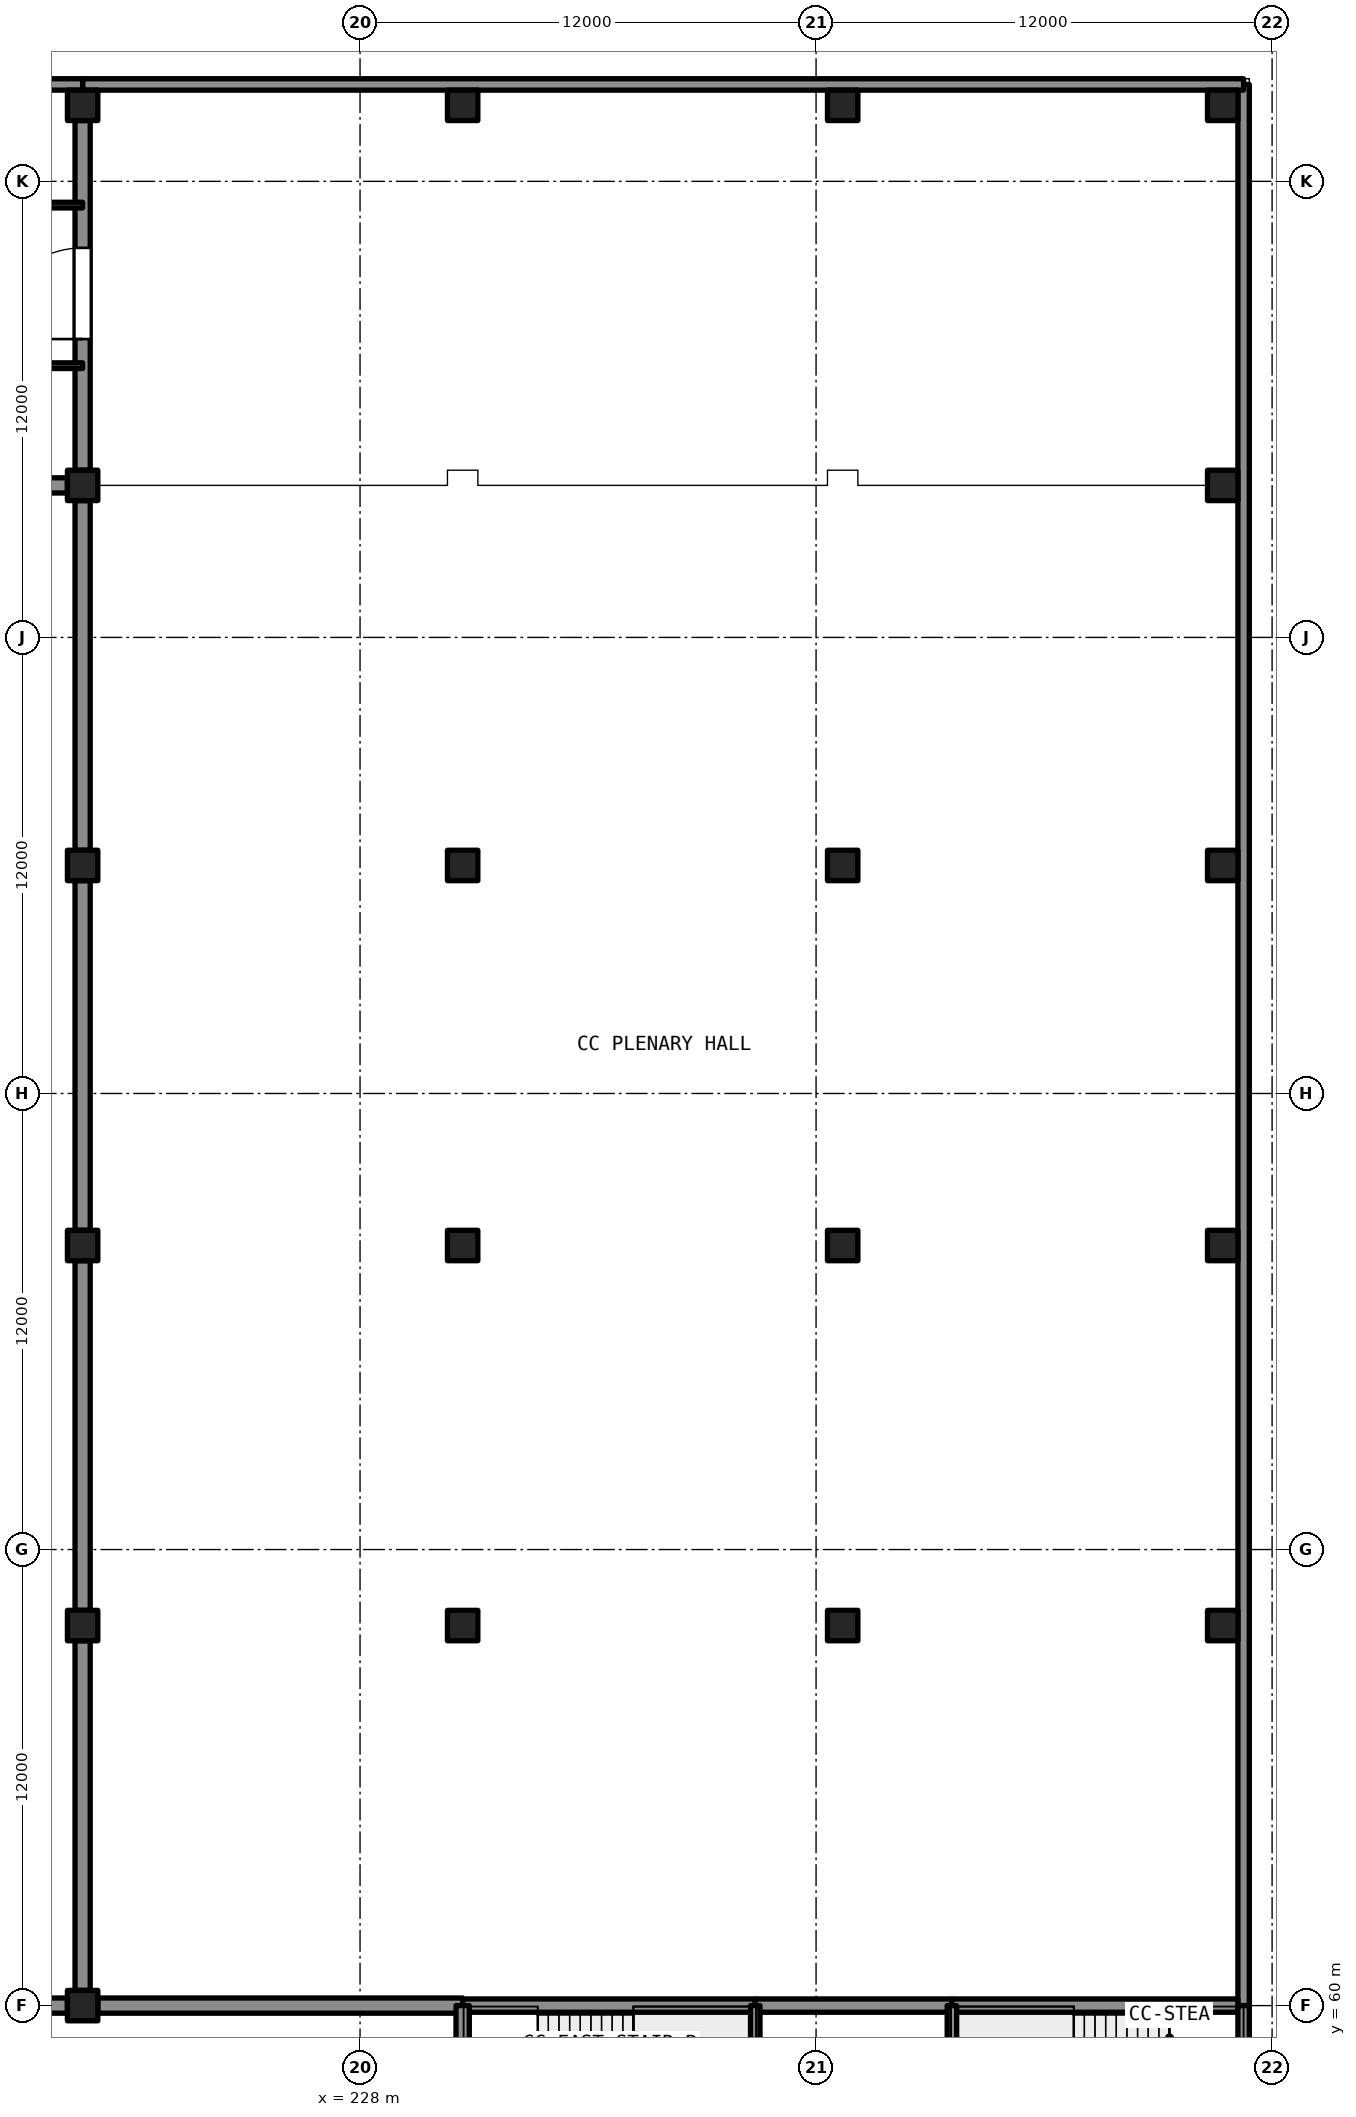
"""IFC4 building model, lengths in metres.
Left out: names, types, materials, properties, quantities, classifications, styles, units other than length and angle.
Written with IfcOpenShell. Run it as: python <this file> out.ifc"""

import sys

from ifc_helpers import new_model, si_unit, direction, frame, frame_2d, origin, origin_2d, place, context, subcontext, project, spatial, rectangle, extrude, element, fill, save


model = new_model("IFC4")
c1 = context("Model", 3, precision=1e-05, world=origin(), true_north=direction((0.0, 1.0)))
c2 = subcontext(c1, "Body", "Model", "MODEL_VIEW")
j1 = project(units=[si_unit("LENGTHUNIT", "METRE"), si_unit("PLANEANGLEUNIT", "RADIAN")], contexts=[c1])
p1 = place(None, origin())
s1 = spatial("IfcSite", under=j1, at=p1, CompositionType="ELEMENT")
p2 = place(p1, origin())
s2 = spatial("IfcBuilding", under=s1, at=p2, CompositionType="ELEMENT")
p3 = place(p2, frame((0.0, 0.0, 9.0)))
s3 = spatial("IfcBuildingStorey", under=s2, at=p3, CompositionType="ELEMENT", Elevation=9.0)
for number, where, z_axis, x_axis in (
    (1, (220.7, 60.0, 0.0), (0.0, 0.0, 1.0), (1.0, 0.0, 0.0)),
    (2, (220.7, 70.0, 0.0), (0.0, 0.0, 1.0), (1.0, 0.0, 0.0)),
    (3, (220.7, 80.0, 0.0), (0.0, 0.0, 1.0), (1.0, 0.0, 0.0)),
    (4, (220.7, 90.0, 0.0), (0.0, 0.0, 1.0), (1.0, 0.0, 0.0)),
    (5, (220.7, 100.0, 0.0), (0.0, 0.0, 1.0), (1.0, 0.0, 0.0)),
    (6, (220.7, 110.0, 0.0), (0.0, 0.0, 1.0), (1.0, 0.0, 0.0)),
):
    element("IfcColumn", number, at=place(p3, frame(where, z_axis=z_axis, x_axis=x_axis)), inside=s3, PredefinedType="COLUMN", context=c2, shape_type="SweptSolid", body=[
        extrude(rectangle(XDim=0.8, YDim=0.8, at=origin_2d()), origin(), (0.0, 0.0, 1.0), 6.0),
    ])
p4 = place(p3, frame((230.7, 70.0, 0.0), z_axis=(0.0, 0.0, 1.0), x_axis=(1.0, 0.0, 0.0)))
e7 = element("IfcColumn", 7, at=p4, inside=s3, PredefinedType="COLUMN", context=c2, shape_type="SweptSolid", body=[
    extrude(rectangle(XDim=0.8, YDim=0.8, at=origin_2d()), origin(), (0.0, 0.0, 1.0), 4.045),
])
p5 = place(p3, frame((230.7, 80.0, 0.0), z_axis=(0.0, 0.0, 1.0), x_axis=(1.0, 0.0, 0.0)))
e8 = element("IfcColumn", 8, at=p5, inside=s3, PredefinedType="COLUMN", context=c2, shape_type="SweptSolid", body=[
    extrude(rectangle(XDim=0.8, YDim=0.8, at=origin_2d()), origin(), (0.0, 0.0, 1.0), 2.545),
])
p6 = place(p3, frame((230.7, 90.0, 0.0), z_axis=(0.0, 0.0, 1.0), x_axis=(1.0, 0.0, 0.0)))
e9 = element("IfcColumn", 9, at=p6, inside=s3, PredefinedType="COLUMN", context=c2, shape_type="SweptSolid", body=[
    extrude(rectangle(XDim=0.8, YDim=0.8, at=origin_2d()), origin(), (0.0, 0.0, 1.0), 1.045),
])
p7 = place(p3, frame((230.7, 110.0, 0.0), z_axis=(0.0, 0.0, 1.0), x_axis=(1.0, 0.0, 0.0)))
e10 = element("IfcColumn", 10, at=p7, inside=s3, PredefinedType="COLUMN", context=c2, shape_type="SweptSolid", body=[
    extrude(rectangle(XDim=0.8, YDim=0.8, at=origin_2d()), origin(), (0.0, 0.0, 1.0), 6.0),
])
p8 = place(p3, frame((240.7, 70.0, 0.0), z_axis=(0.0, 0.0, 1.0), x_axis=(1.0, 0.0, 0.0)))
e11 = element("IfcColumn", 11, at=p8, inside=s3, PredefinedType="COLUMN", context=c2, shape_type="SweptSolid", body=[
    extrude(rectangle(XDim=0.8, YDim=0.8, at=origin_2d()), origin(), (0.0, 0.0, 1.0), 4.045),
])
p9 = place(p3, frame((240.7, 80.0, 0.0), z_axis=(0.0, 0.0, 1.0), x_axis=(1.0, 0.0, 0.0)))
e12 = element("IfcColumn", 12, at=p9, inside=s3, PredefinedType="COLUMN", context=c2, shape_type="SweptSolid", body=[
    extrude(rectangle(XDim=0.8, YDim=0.8, at=origin_2d()), origin(), (0.0, 0.0, 1.0), 2.545),
])
p10 = place(p3, frame((240.7, 90.0, 0.0), z_axis=(0.0, 0.0, 1.0), x_axis=(1.0, 0.0, 0.0)))
e13 = element("IfcColumn", 13, at=p10, inside=s3, PredefinedType="COLUMN", context=c2, shape_type="SweptSolid", body=[
    extrude(rectangle(XDim=0.8, YDim=0.8, at=origin_2d()), origin(), (0.0, 0.0, 1.0), 1.045),
])
for number, where, z_axis, x_axis in (
    (14, (240.7, 110.0, 0.0), (0.0, 0.0, 1.0), (1.0, 0.0, 0.0)),
    (15, (250.7, 70.0, 0.0), (0.0, 0.0, 1.0), (1.0, 0.0, 0.0)),
    (16, (250.7, 80.0, 0.0), (0.0, 0.0, 1.0), (1.0, 0.0, 0.0)),
    (17, (250.7, 90.0, 0.0), (0.0, 0.0, 1.0), (1.0, 0.0, 0.0)),
    (18, (250.7, 100.0, 0.0), (0.0, 0.0, 1.0), (1.0, 0.0, 0.0)),
    (19, (250.7, 110.0, 0.0), (0.0, 0.0, 1.0), (1.0, 0.0, 0.0)),
):
    element("IfcColumn", number, at=place(p3, frame(where, z_axis=z_axis, x_axis=x_axis)), inside=s3, PredefinedType="COLUMN", context=c2, shape_type="SweptSolid", body=[
        extrude(rectangle(XDim=0.8, YDim=0.8, at=origin_2d()), origin(), (0.0, 0.0, 1.0), 6.0),
    ])
for number, where, z_axis, x_axis in (
    (20, (211.1, 60.0, 0.0), (0.0, 0.0, 1.0), (1.0, 0.0, 0.0)),
    (21, (211.1, 100.0, 0.0), (0.0, 0.0, 1.0), (1.0, 0.0, 0.0)),
):
    element("IfcWall", number, at=place(p3, frame(where, z_axis=z_axis, x_axis=x_axis)), inside=s3, PredefinedType="SHEAR", context=c2, shape_type="SweptSolid", body=[
        extrude(rectangle(XDim=9.2, YDim=0.4, at=frame_2d((4.6, 0.0))), origin(), (0.0, 0.0, 1.0), 5.59),
    ])
for number, where, z_axis, x_axis in (
    (22, (220.7, 60.4, 0.0), (0.0, 0.0, 1.0), (0.0, 1.0, 0.0)),
    (23, (220.7, 70.4, 0.0), (0.0, 0.0, 1.0), (0.0, 1.0, 0.0)),
    (24, (220.7, 80.4, 0.0), (0.0, 0.0, 1.0), (0.0, 1.0, 0.0)),
    (25, (220.7, 90.4, 0.0), (0.0, 0.0, 1.0), (0.0, 1.0, 0.0)),
):
    element("IfcWall", number, at=place(p3, frame(where, z_axis=z_axis, x_axis=x_axis)), inside=s3, PredefinedType="SHEAR", context=c2, shape_type="SweptSolid", body=[
        extrude(rectangle(XDim=9.2, YDim=0.4, at=frame_2d((4.6, 0.0))), origin(), (0.0, 0.0, 1.0), 6.0),
    ])
p11 = place(p3, frame((221.1, 60.0, 0.0), z_axis=(0.0, 0.0, 1.0), x_axis=(1.0, 0.0, 0.0)))
e26 = element("IfcWall", 26, at=p11, inside=s3, PredefinedType="SHEAR", context=c2, shape_type="SweptSolid", body=[
    extrude(rectangle(XDim=9.6, YDim=0.4, at=frame_2d((4.8, 0.0))), origin(), (0.0, 0.0, 1.0), 6.0),
])
p12 = place(p3, frame((220.7, 100.4, 0.0), z_axis=(0.0, 0.0, 1.0), x_axis=(0.0, 1.0, 0.0)))
e27 = element("IfcWall", 27, at=p12, inside=s3, PredefinedType="SHEAR", context=c2, shape_type="SweptSolid", body=[
    extrude(rectangle(XDim=9.2, YDim=0.4, at=frame_2d((4.6, 0.0))), origin(), (0.0, 0.0, 1.0), 6.0),
])
p13 = place(p12, frame((3.45, 0.0, 0.0)))
e28 = element("IfcOpeningElement", 28, at=p13, cuts=e27, PredefinedType="OPENING", context=c2, shape_type="SweptSolid", body=[
    extrude(rectangle(XDim=2.4, YDim=2.4, at=frame_2d((1.2, 1.2))), frame((0.0, 0.21, 0.0), z_axis=(0.0, -1.0, 0.0), x_axis=(1.0, 0.0, 0.0)), (0.0, 0.0, 1.0), 0.421),
])
p14 = place(p3, frame((251.25, 60.0, 0.0), z_axis=(0.0, 0.0, 1.0), x_axis=(0.0, 1.0, 0.0)))
e29 = element("IfcWall", 29, at=p14, inside=s3, PredefinedType="SOLIDWALL", context=c2, shape_type="SweptSolid", body=[
    extrude(rectangle(XDim=50.55, YDim=0.3, at=frame_2d((25.275, 0.0))), origin(), (0.0, 0.0, 1.0), 6.0),
])
p15 = place(p3, frame((220.7, 110.55, 0.0), z_axis=(0.0, 0.0, 1.0), x_axis=(1.0, 0.0, 0.0)))
e30 = element("IfcWall", 30, at=p15, inside=s3, PredefinedType="SOLIDWALL", context=c2, shape_type="SweptSolid", body=[
    extrude(rectangle(XDim=30.55, YDim=0.3, at=frame_2d((15.275, 0.0))), origin(), (0.0, 0.0, 1.0), 6.0),
])
p16 = place(p3, frame((230.7, 60.0, 0.0), z_axis=(0.0, 0.0, 1.0), x_axis=(1.0, 0.0, 0.0)))
e31 = element("IfcWall", 31, at=p16, inside=s3, PredefinedType="SHEAR", context=c2, shape_type="SweptSolid", body=[
    extrude(rectangle(XDim=7.7, YDim=0.35, at=frame_2d((3.85, 0.0))), origin(), (0.0, 0.0, 1.0), 5.59),
])
p17 = place(p3, frame((238.4, 60.0, 0.0), z_axis=(0.0, 0.0, 1.0), x_axis=(1.0, 0.0, 0.0)))
e32 = element("IfcWall", 32, at=p17, inside=s3, PredefinedType="SHEAR", context=c2, shape_type="SweptSolid", body=[
    extrude(rectangle(XDim=5.175, YDim=0.35, at=frame_2d((2.587, 0.0))), origin(), (0.0, 0.0, 1.0), 5.59),
])
p18 = place(p3, frame((243.575, 60.0, 0.0), z_axis=(0.0, 0.0, 1.0), x_axis=(1.0, 0.0, 0.0)))
e33 = element("IfcWall", 33, at=p18, inside=s3, PredefinedType="SHEAR", context=c2, shape_type="SweptSolid", body=[
    extrude(rectangle(XDim=7.525, YDim=0.35, at=frame_2d((3.763, 0.0))), origin(), (0.0, 0.0, 1.0), 5.59),
])
p19 = place(p3, frame((230.7, 56.85, 0.0), z_axis=(0.0, 0.0, 1.0), x_axis=(0.0, 1.0, 0.0)))
e34 = element("IfcWall", 34, at=p19, inside=s3, PredefinedType="SHEAR", context=c2, shape_type="SweptSolid", body=[
    extrude(rectangle(XDim=3.15, YDim=0.35, at=frame_2d((1.575, 0.0))), origin(), (0.0, 0.0, 1.0), 5.59),
])
for number, where, z_axis, x_axis in (
    (35, (243.575, 56.85, 0.0), (0.0, 0.0, 1.0), (0.0, 1.0, 0.0)),
    (36, (238.4, 56.85, 0.0), (0.0, 0.0, 1.0), (0.0, 1.0, 0.0)),
):
    element("IfcWall", number, at=place(p3, frame(where, z_axis=z_axis, x_axis=x_axis)), inside=s3, PredefinedType="SHEAR", context=c2, shape_type="SweptSolid", body=[
        extrude(rectangle(XDim=3.15, YDim=0.25, at=frame_2d((1.575, 0.0))), origin(), (0.0, 0.0, 1.0), 5.59),
    ])
p20 = place(p3, frame((170.7, 110.55, 0.0), z_axis=(0.0, 0.0, 1.0), x_axis=(1.0, 0.0, 0.0)))
e37 = element("IfcWall", 37, at=p20, inside=s3, PredefinedType="SOLIDWALL", context=c2, shape_type="SweptSolid", body=[
    extrude(rectangle(XDim=50.0, YDim=0.3, at=frame_2d((25.0, 0.0))), origin(), (0.0, 0.0, 1.0), 5.59),
])
p21 = place(p20, frame((3.7, 0.0, 0.9)))
e38 = element("IfcOpeningElement", 38, at=p21, cuts=e37, PredefinedType="OPENING", context=c2, shape_type="SweptSolid", body=[
    extrude(rectangle(XDim=2.4, YDim=1.8, at=frame_2d((1.2, 0.9))), frame((0.0, 0.161, 0.0), z_axis=(0.0, -1.0, 0.0), x_axis=(1.0, 0.0, 0.0)), (0.0, 0.0, 1.0), 0.321),
])
p22 = place(p20, frame((13.7, 0.0, 0.9)))
e39 = element("IfcOpeningElement", 39, at=p22, cuts=e37, PredefinedType="OPENING", context=c2, shape_type="SweptSolid", body=[
    extrude(rectangle(XDim=2.4, YDim=1.8, at=frame_2d((1.2, 0.9))), frame((0.0, 0.161, 0.0), z_axis=(0.0, -1.0, 0.0), x_axis=(1.0, 0.0, 0.0)), (0.0, 0.0, 1.0), 0.321),
])
p23 = place(p20, frame((23.7, 0.0, 0.9)))
e40 = element("IfcOpeningElement", 40, at=p23, cuts=e37, PredefinedType="OPENING", context=c2, shape_type="SweptSolid", body=[
    extrude(rectangle(XDim=2.4, YDim=1.8, at=frame_2d((1.2, 0.9))), frame((0.0, 0.161, 0.0), z_axis=(0.0, -1.0, 0.0), x_axis=(1.0, 0.0, 0.0)), (0.0, 0.0, 1.0), 0.321),
])
p24 = place(p20, frame((33.7, 0.0, 0.9)))
e41 = element("IfcOpeningElement", 41, at=p24, cuts=e37, PredefinedType="OPENING", context=c2, shape_type="SweptSolid", body=[
    extrude(rectangle(XDim=2.4, YDim=1.8, at=frame_2d((1.2, 0.9))), frame((0.0, 0.161, 0.0), z_axis=(0.0, -1.0, 0.0), x_axis=(1.0, 0.0, 0.0)), (0.0, 0.0, 1.0), 0.321),
])
p25 = place(p20, frame((43.7, 0.0, 0.9)))
e42 = element("IfcOpeningElement", 42, at=p25, cuts=e37, PredefinedType="OPENING", context=c2, shape_type="SweptSolid", body=[
    extrude(rectangle(XDim=2.4, YDim=1.8, at=frame_2d((1.2, 0.9))), frame((0.0, 0.161, 0.0), z_axis=(0.0, -1.0, 0.0), x_axis=(1.0, 0.0, 0.0)), (0.0, 0.0, 1.0), 0.321),
])
p26 = place(p3, frame((251.25, 56.85, 0.0), z_axis=(0.0, 0.0, 1.0), x_axis=(0.0, 1.0, 0.0)))
e43 = element("IfcWall", 43, at=p26, inside=s3, PredefinedType="SOLIDWALL", context=c2, shape_type="SweptSolid", body=[
    extrude(rectangle(XDim=3.15, YDim=0.3, at=frame_2d((1.575, 0.0))), origin(), (0.0, 0.0, 1.0), 5.59),
])
p27 = place(p3, frame((209.0, 103.15, 0.0), z_axis=(0.0, 0.0, 1.0), x_axis=(1.0, 0.0, 0.0)))
e44 = element("IfcWall", 44, at=p27, inside=s3, PredefinedType="PARTITIONING", context=c2, shape_type="SweptSolid", body=[
    extrude(rectangle(XDim=11.7, YDim=0.15, at=frame_2d((5.85, 0.0))), origin(), (0.0, 0.0, 1.0), 5.59),
])
p28 = place(p27, frame((5.45, 0.0, 0.0)))
e45 = element("IfcOpeningElement", 45, at=p28, cuts=e44, PredefinedType="OPENING", context=c2, shape_type="SweptSolid", body=[
    extrude(rectangle(XDim=1.0, YDim=2.1, at=frame_2d((0.5, 1.05))), frame((0.0, 0.085, 0.0), z_axis=(0.0, -1.0, 0.0), x_axis=(1.0, 0.0, 0.0)), (0.0, 0.0, 1.0), 0.171),
])
p29 = place(p3, frame((220.7, 107.375, 0.0), z_axis=(0.0, 0.0, 1.0), x_axis=(-1.0, 0.0, 0.0)))
e46 = element("IfcWall", 46, at=p29, inside=s3, PredefinedType="PARTITIONING", context=c2, shape_type="SweptSolid", body=[
    extrude(rectangle(XDim=50.0, YDim=0.15, at=frame_2d((25.0, 0.0))), origin(), (0.0, 0.0, 1.0), 5.59),
])
p30 = place(p29, frame((44.55, 0.0, 0.0)))
e47 = element("IfcOpeningElement", 47, at=p30, cuts=e46, PredefinedType="OPENING", context=c2, shape_type="SweptSolid", body=[
    extrude(rectangle(XDim=1.0, YDim=2.1, at=frame_2d((0.5, 1.05))), frame((0.0, 0.085, 0.0), z_axis=(0.0, -1.0, 0.0), x_axis=(1.0, 0.0, 0.0)), (0.0, 0.0, 1.0), 0.171),
])
p31 = place(p29, frame((34.55, 0.0, 0.0)))
e48 = element("IfcOpeningElement", 48, at=p31, cuts=e46, PredefinedType="OPENING", context=c2, shape_type="SweptSolid", body=[
    extrude(rectangle(XDim=1.0, YDim=2.1, at=frame_2d((0.5, 1.05))), frame((0.0, 0.085, 0.0), z_axis=(0.0, -1.0, 0.0), x_axis=(1.0, 0.0, 0.0)), (0.0, 0.0, 1.0), 0.171),
])
p32 = place(p29, frame((24.55, 0.0, 0.0)))
e49 = element("IfcOpeningElement", 49, at=p32, cuts=e46, PredefinedType="OPENING", context=c2, shape_type="SweptSolid", body=[
    extrude(rectangle(XDim=1.0, YDim=2.1, at=frame_2d((0.5, 1.05))), frame((0.0, 0.085, 0.0), z_axis=(0.0, -1.0, 0.0), x_axis=(1.0, 0.0, 0.0)), (0.0, 0.0, 1.0), 0.171),
])
p33 = place(p29, frame((14.55, 0.0, 0.0)))
e50 = element("IfcOpeningElement", 50, at=p33, cuts=e46, PredefinedType="OPENING", context=c2, shape_type="SweptSolid", body=[
    extrude(rectangle(XDim=1.0, YDim=2.1, at=frame_2d((0.5, 1.05))), frame((0.0, 0.085, 0.0), z_axis=(0.0, -1.0, 0.0), x_axis=(1.0, 0.0, 0.0)), (0.0, 0.0, 1.0), 0.171),
])
p34 = place(p29, frame((4.55, 0.0, 0.0)))
e51 = element("IfcOpeningElement", 51, at=p34, cuts=e46, PredefinedType="OPENING", context=c2, shape_type="SweptSolid", body=[
    extrude(rectangle(XDim=1.0, YDim=2.1, at=frame_2d((0.5, 1.05))), frame((0.0, 0.085, 0.0), z_axis=(0.0, -1.0, 0.0), x_axis=(1.0, 0.0, 0.0)), (0.0, 0.0, 1.0), 0.171),
])
p35 = place(p13, origin())
e52 = element("IfcDoor", 52, at=p35, inside=s3, OperationType="DOUBLE_DOOR_SINGLE_SWING", PredefinedType="DOOR", context=c2, shape_type="SweptSolid", body=[
    extrude(rectangle(XDim=2.4, YDim=2.4, at=frame_2d((1.2, 1.2))), frame((0.0, 0.025, 0.0), z_axis=(0.0, -1.0, 0.0), x_axis=(1.0, 0.0, 0.0)), (0.0, 0.0, 1.0), 0.05),
])
fill(e28, e52)
save(model, sys.argv[1])
